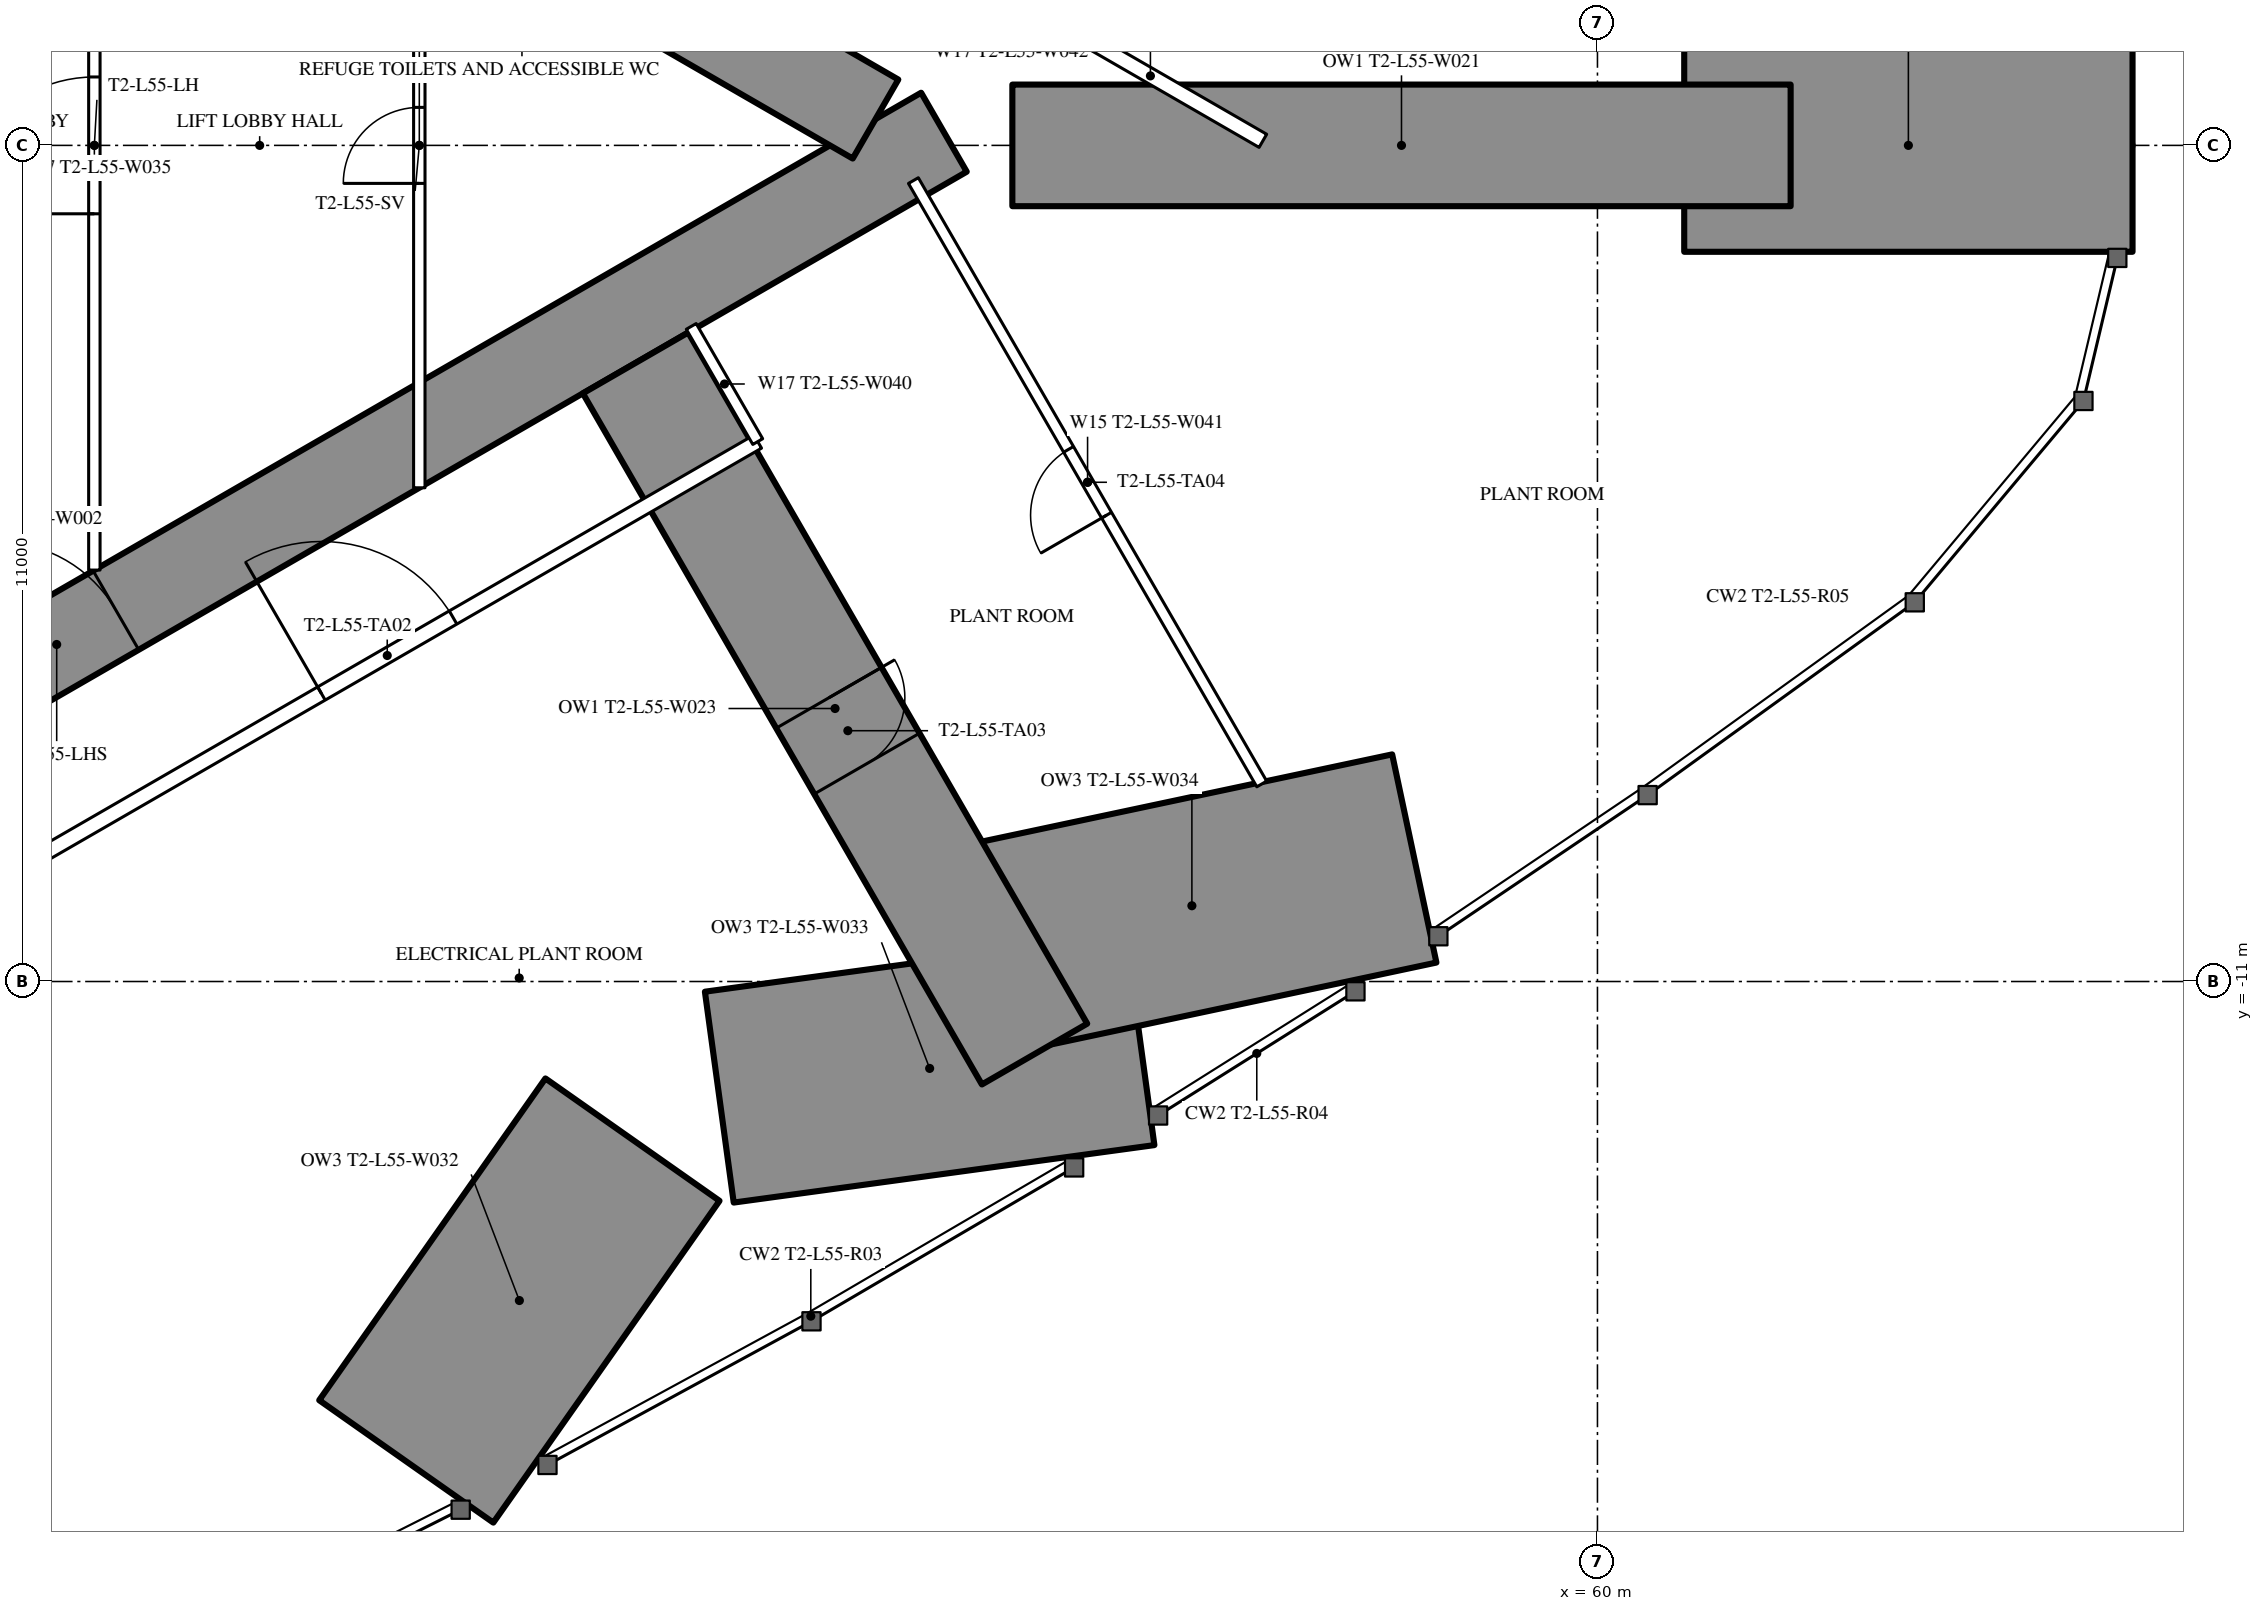
"""IFC4 building model, lengths in metres.
Left out: names, types, materials, properties, quantities, classifications, styles, units other than length and angle.
Written with IfcOpenShell. Run it as: python <this file> out.ifc"""

import sys

from ifc_helpers import new_model, si_unit, direction, frame, frame_2d, origin, place, context, subcontext, project, spatial, rectangle, extrude, element, fill, save


model = new_model("IFC4")
c1 = context("Model", 3, precision=1e-05, world=origin(), true_north=direction((0.0, 1.0)))
c2 = subcontext(c1, "Body", "Model", "MODEL_VIEW")
j1 = project(units=[si_unit("LENGTHUNIT", "METRE"), si_unit("PLANEANGLEUNIT", "RADIAN")], contexts=[c1])
p1 = place(None, origin())
s1 = spatial("IfcSite", under=j1, at=p1, CompositionType="ELEMENT")
p2 = place(p1, origin())
s2 = spatial("IfcBuilding", under=s1, at=p2, CompositionType="ELEMENT")
p3 = place(p2, frame((0.0, 0.0, 205.3)))
s3 = spatial("IfcBuildingStorey", under=s2, at=p3, CompositionType="ELEMENT", Elevation=205.3)
p4 = place(p3, frame((67.04, 0.0, 0.0), z_axis=(0.0, 0.0, 1.0), x_axis=(-1.0, 0.0, 0.0)))
e1 = element("IfcWall", 1, at=p4, inside=s3, PredefinedType="SHEAR", context=c2, shape_type="SweptSolid", body=[
    extrude(rectangle(XDim=5.898, YDim=2.8, at=frame_2d((2.949, 0.0))), origin(), (0.0, 0.0, 1.0), 5.0),
])
p5 = place(p3, frame((44.328, -17.314, 0.0), z_axis=(0.0, 0.0, 1.0), x_axis=(0.575107689221, 0.818077713789, 0.0)))
e2 = element("IfcWall", 2, at=p5, inside=s3, PredefinedType="SHEAR", context=c2, shape_type="SweptSolid", body=[
    extrude(rectangle(XDim=5.175, YDim=2.8, at=frame_2d((2.587, 0.0))), origin(), (0.0, 0.0, 1.0), 5.0),
])
p6 = place(p3, frame((53.981, -11.765, 0.0), z_axis=(0.0, 0.0, 1.0), x_axis=(-0.99079635938, -0.135360903657, 0.0)))
e3 = element("IfcWall", 3, at=p6, inside=s3, PredefinedType="SHEAR", context=c2, shape_type="SweptSolid", body=[
    extrude(rectangle(XDim=5.586, YDim=2.8, at=frame_2d((2.793, 0.0))), origin(), (0.0, 0.0, 1.0), 5.0),
])
p7 = place(p3, frame((57.59, -9.381, 0.0), z_axis=(0.0, 0.0, 1.0), x_axis=(-0.978147441256, -0.207912441101, 0.0)))
e4 = element("IfcWall", 4, at=p7, inside=s3, PredefinedType="SHEAR", context=c2, shape_type="SweptSolid", body=[
    extrude(rectangle(XDim=5.983, YDim=2.8, at=frame_2d((2.991, 0.0))), origin(), (0.0, 0.0, 1.0), 5.0),
])
p8 = place(p3, frame((27.2, -13.8, 0.0), z_axis=(0.0, 0.0, 1.0), x_axis=(0.866027159892, 0.499996958321, 0.0)))
e5 = element("IfcWall", 5, at=p8, inside=s3, PredefinedType="SHEAR", context=c2, shape_type="SweptSolid", body=[
    extrude(rectangle(XDim=27.947, YDim=1.2, at=frame_2d((13.973, 0.0))), origin(), (0.0, 0.0, 1.0), 5.0),
])
p9 = place(p8, frame((6.5, 0.0, 0.0)))
e6 = element("IfcOpeningElement", 6, at=p9, cuts=e5, PredefinedType="OPENING", context=c2, shape_type="SweptSolid", body=[
    extrude(rectangle(XDim=1.0, YDim=2.2, at=frame_2d((0.5, 1.1))), frame((0.0, 0.61, 0.0), z_axis=(0.0, -1.0, 0.0), x_axis=(1.0, 0.0, 0.0)), (0.0, 0.0, 1.0), 1.22),
])
p10 = place(p8, frame((13.568, 0.0, 0.0)))
e7 = element("IfcOpeningElement", 7, at=p10, cuts=e5, PredefinedType="OPENING", context=c2, shape_type="SweptSolid", body=[
    extrude(rectangle(XDim=1.8, YDim=2.2, at=frame_2d((0.9, 1.1))), frame((0.0, 0.61, 0.0), z_axis=(0.0, -1.0, 0.0), x_axis=(1.0, 0.0, 0.0)), (0.0, 0.0, 1.0), 1.22),
])
p11 = place(p3, frame((27.2, 13.8, 0.0), z_axis=(0.0, 0.0, 1.0), x_axis=(0.866024515034, -0.500001539357, 0.0)))
e8 = element("IfcWall", 8, at=p11, inside=s3, PredefinedType="SHEAR", context=c2, shape_type="SweptSolid", body=[
    extrude(rectangle(XDim=26.907, YDim=1.2, at=frame_2d((13.454, 0.0))), origin(), (0.0, 0.0, 1.0), 5.0),
])
p12 = place(p11, frame((6.5, 0.0, 0.0)))
e9 = element("IfcOpeningElement", 9, at=p12, cuts=e8, PredefinedType="OPENING", context=c2, shape_type="SweptSolid", body=[
    extrude(rectangle(XDim=1.0, YDim=2.2, at=frame_2d((0.5, 1.1))), frame((0.0, 0.61, 0.0), z_axis=(0.0, -1.0, 0.0), x_axis=(1.0, 0.0, 0.0)), (0.0, 0.0, 1.0), 1.22),
])
p13 = place(p11, frame((13.568, 0.0, 0.0)))
e10 = element("IfcOpeningElement", 10, at=p13, cuts=e8, PredefinedType="OPENING", context=c2, shape_type="SweptSolid", body=[
    extrude(rectangle(XDim=1.8, YDim=2.2, at=frame_2d((0.9, 1.1))), frame((0.0, 0.61, 0.0), z_axis=(0.0, -1.0, 0.0), x_axis=(1.0, 0.0, 0.0)), (0.0, 0.0, 1.0), 1.22),
])
p14 = place(p3, frame((47.345, -2.862, 0.0), z_axis=(0.0, 0.0, 1.0), x_axis=(0.500012973899, -0.866017913171, 0.0)))
e11 = element("IfcWall", 11, at=p14, inside=s3, PredefinedType="SHEAR", context=c2, shape_type="SweptSolid", body=[
    extrude(rectangle(XDim=10.499, YDim=1.6, at=frame_2d((5.25, 0.0))), origin(), (0.0, 0.0, 1.0), 5.0),
])
p15 = place(p14, frame((5.087, 0.0, 0.0)))
e12 = element("IfcOpeningElement", 12, at=p15, cuts=e11, PredefinedType="OPENING", context=c2, shape_type="SweptSolid", body=[
    extrude(rectangle(XDim=1.0, YDim=2.2, at=frame_2d((0.5, 1.1))), frame((0.0, 0.81, 0.0), z_axis=(0.0, -1.0, 0.0), x_axis=(1.0, 0.0, 0.0)), (0.0, 0.0, 1.0), 1.62),
])
p16 = place(p3, frame((52.302, 0.0, 0.0), z_axis=(0.0, 0.0, 1.0), x_axis=(1.0, 0.0, 0.0)))
e13 = element("IfcWall", 13, at=p16, inside=s3, PredefinedType="SHEAR", context=c2, shape_type="SweptSolid", body=[
    extrude(rectangle(XDim=10.239, YDim=1.6, at=frame_2d((5.12, 0.0))), origin(), (0.0, 0.0, 1.0), 5.0),
])
p17 = place(p3, frame((55.583, -8.401, 0.0), z_axis=(0.0, 0.0, 1.0), x_axis=(-0.499997575924, 0.866026803321, 0.0)))
e14 = element("IfcWall", 14, at=p17, inside=s3, PredefinedType="PARTITIONING", context=c2, shape_type="SweptSolid", body=[
    extrude(rectangle(XDim=9.167, YDim=0.15, at=frame_2d((4.583, 0.0))), origin(), (0.0, 0.0, 1.0), 4.75),
])
p18 = place(p17, frame((4.083, 0.0, 0.0)))
e15 = element("IfcOpeningElement", 15, at=p18, cuts=e14, PredefinedType="OPENING", context=c2, shape_type="SweptSolid", body=[
    extrude(rectangle(XDim=1.0, YDim=2.2, at=frame_2d((0.5, 1.1))), frame((0.0, 0.085, 0.0), z_axis=(0.0, -1.0, 0.0), x_axis=(1.0, 0.0, 0.0)), (0.0, 0.0, 1.0), 0.17),
])
p19 = place(p3, frame((52.639, 1.769, 0.0), z_axis=(0.0, 0.0, 1.0), x_axis=(0.866027340901, -0.4999966448, 0.0)))
e16 = element("IfcWall", 16, at=p19, inside=s3, PredefinedType="PARTITIONING", context=c2, shape_type="SweptSolid", body=[
    extrude(rectangle(XDim=3.417, YDim=0.2, at=frame_2d((1.708, 0.0))), origin(), (0.0, 0.0, 1.0), 4.75),
])
p20 = place(p3, frame((27.959, -16.017, 0.0), z_axis=(0.0, 0.0, 1.0), x_axis=(0.866026253963, 0.499998527445, 0.0)))
e17 = element("IfcWall", 17, at=p20, inside=s3, PredefinedType="PARTITIONING", context=c2, shape_type="SweptSolid", body=[
    extrude(rectangle(XDim=24.241, YDim=0.2, at=frame_2d((12.12, 0.0))), origin(), (0.0, 0.0, 1.0), 4.75),
])
p21 = place(p20, frame((6.579, 0.0, 0.0)))
e18 = element("IfcOpeningElement", 18, at=p21, cuts=e17, PredefinedType="OPENING", context=c2, shape_type="SweptSolid", body=[
    extrude(rectangle(XDim=1.8, YDim=2.2, at=frame_2d((0.9, 1.1))), frame((0.0, 0.11, 0.0), z_axis=(0.0, -1.0, 0.0), x_axis=(1.0, 0.0, 0.0)), (0.0, 0.0, 1.0), 0.22),
])
p22 = place(p20, frame((17.612, 0.0, 0.0)))
e19 = element("IfcOpeningElement", 19, at=p22, cuts=e17, PredefinedType="OPENING", context=c2, shape_type="SweptSolid", body=[
    extrude(rectangle(XDim=2.0, YDim=2.4, at=frame_2d((1.0, 1.2))), frame((0.0, 0.11, 0.0), z_axis=(0.0, -1.0, 0.0), x_axis=(1.0, 0.0, 0.0)), (0.0, 0.0, 1.0), 0.22),
])
p23 = place(p3, frame((48.953, -3.897, 0.0), z_axis=(0.0, 0.0, 1.0), x_axis=(-0.499980071345, 0.866036909293, 0.0)))
e20 = element("IfcWall", 20, at=p23, inside=s3, PredefinedType="PARTITIONING", context=c2, shape_type="SweptSolid", body=[
    extrude(rectangle(XDim=1.75, YDim=0.15, at=frame_2d((0.875, 0.0))), origin(), (0.0, 0.0, 1.0), 4.75),
])
p24 = place(p3, frame((40.225, -5.587, 0.0), z_axis=(0.0, 0.0, 1.0), x_axis=(0.0, 1.0, 0.0)))
e21 = element("IfcWall", 21, at=p24, inside=s3, PredefinedType="PARTITIONING", context=c2, shape_type="SweptSolid", body=[
    extrude(rectangle(XDim=11.174, YDim=0.15, at=frame_2d((5.587, 0.0))), origin(), (0.0, 0.0, 1.0), 4.75),
])
p25 = place(p24, frame((4.687, 0.0, 0.0)))
e22 = element("IfcOpeningElement", 22, at=p25, cuts=e21, PredefinedType="OPENING", context=c2, shape_type="SweptSolid", body=[
    extrude(rectangle(XDim=1.8, YDim=2.2, at=frame_2d((0.9, 1.1))), frame((0.0, 0.085, 0.0), z_axis=(0.0, -1.0, 0.0), x_axis=(1.0, 0.0, 0.0)), (0.0, 0.0, 1.0), 0.17),
])
p26 = place(p3, frame((44.5, -4.505, 0.0), z_axis=(0.0, 0.0, 1.0), x_axis=(0.0, 1.0, 0.0)))
e23 = element("IfcWall", 23, at=p26, inside=s3, PredefinedType="PARTITIONING", context=c2, shape_type="SweptSolid", body=[
    extrude(rectangle(XDim=9.009, YDim=0.15, at=frame_2d((4.505, 0.0))), origin(), (0.0, 0.0, 1.0), 4.75),
])
p27 = place(p26, frame((4.005, 0.0, 0.0)))
e24 = element("IfcOpeningElement", 24, at=p27, cuts=e23, PredefinedType="OPENING", context=c2, shape_type="SweptSolid", body=[
    extrude(rectangle(XDim=1.0, YDim=2.2, at=frame_2d((0.5, 1.1))), frame((0.0, 0.085, 0.0), z_axis=(0.0, -1.0, 0.0), x_axis=(1.0, 0.0, 0.0)), (0.0, 0.0, 1.0), 0.17),
])
p28 = place(p22, origin())
e25 = element("IfcDoor", 25, at=p28, inside=s3, OperationType="DOUBLE_DOOR_SINGLE_SWING", PredefinedType="DOOR", context=c2, shape_type="SweptSolid", body=[
    extrude(rectangle(XDim=2.0, YDim=2.4, at=frame_2d((1.0, 1.2))), frame((0.0, 0.025, 0.0), z_axis=(0.0, -1.0, 0.0), x_axis=(1.0, 0.0, 0.0)), (0.0, 0.0, 1.0), 0.05),
])
fill(e19, e25)
p29 = place(p15, origin())
e26 = element("IfcDoor", 26, at=p29, inside=s3, OperationType="SINGLE_SWING_LEFT", PredefinedType="DOOR", context=c2, shape_type="SweptSolid", body=[
    extrude(rectangle(XDim=1.0, YDim=2.2, at=frame_2d((0.5, 1.1))), frame((0.0, 0.025, 0.0), z_axis=(0.0, -1.0, 0.0), x_axis=(1.0, 0.0, 0.0)), (0.0, 0.0, 1.0), 0.05),
])
fill(e12, e26)
p30 = place(p18, origin())
e27 = element("IfcDoor", 27, at=p30, inside=s3, OperationType="SINGLE_SWING_LEFT", PredefinedType="DOOR", context=c2, shape_type="SweptSolid", body=[
    extrude(rectangle(XDim=1.0, YDim=2.2, at=frame_2d((0.5, 1.1))), frame((0.0, 0.025, 0.0), z_axis=(0.0, -1.0, 0.0), x_axis=(1.0, 0.0, 0.0)), (0.0, 0.0, 1.0), 0.05),
])
fill(e15, e27)
p31 = place(p25, origin())
e28 = element("IfcDoor", 28, at=p31, inside=s3, OperationType="DOUBLE_DOOR_SINGLE_SWING", PredefinedType="DOOR", context=c2, shape_type="SweptSolid", body=[
    extrude(rectangle(XDim=1.8, YDim=2.2, at=frame_2d((0.9, 1.1))), frame((0.0, 0.025, 0.0), z_axis=(0.0, -1.0, 0.0), x_axis=(1.0, 0.0, 0.0)), (0.0, 0.0, 1.0), 0.05),
])
fill(e22, e28)
p32 = place(p27, origin())
e29 = element("IfcDoor", 29, at=p32, inside=s3, OperationType="SINGLE_SWING_LEFT", PredefinedType="DOOR", context=c2, shape_type="SweptSolid", body=[
    extrude(rectangle(XDim=1.0, YDim=2.2, at=frame_2d((0.5, 1.1))), frame((0.0, 0.025, 0.0), z_axis=(0.0, -1.0, 0.0), x_axis=(1.0, 0.0, 0.0)), (0.0, 0.0, 1.0), 0.05),
])
fill(e24, e29)
p33 = place(p10, origin())
e30 = element("IfcDoor", 30, at=p33, inside=s3, OperationType="DOUBLE_DOOR_SINGLE_SWING", PredefinedType="DOOR", context=c2, shape_type="SweptSolid", body=[
    extrude(rectangle(XDim=1.8, YDim=2.2, at=frame_2d((0.9, 1.1))), frame((0.0, 0.025, 0.0), z_axis=(0.0, -1.0, 0.0), x_axis=(1.0, 0.0, 0.0)), (0.0, 0.0, 1.0), 0.05),
])
fill(e7, e30)
save(model, sys.argv[1])
